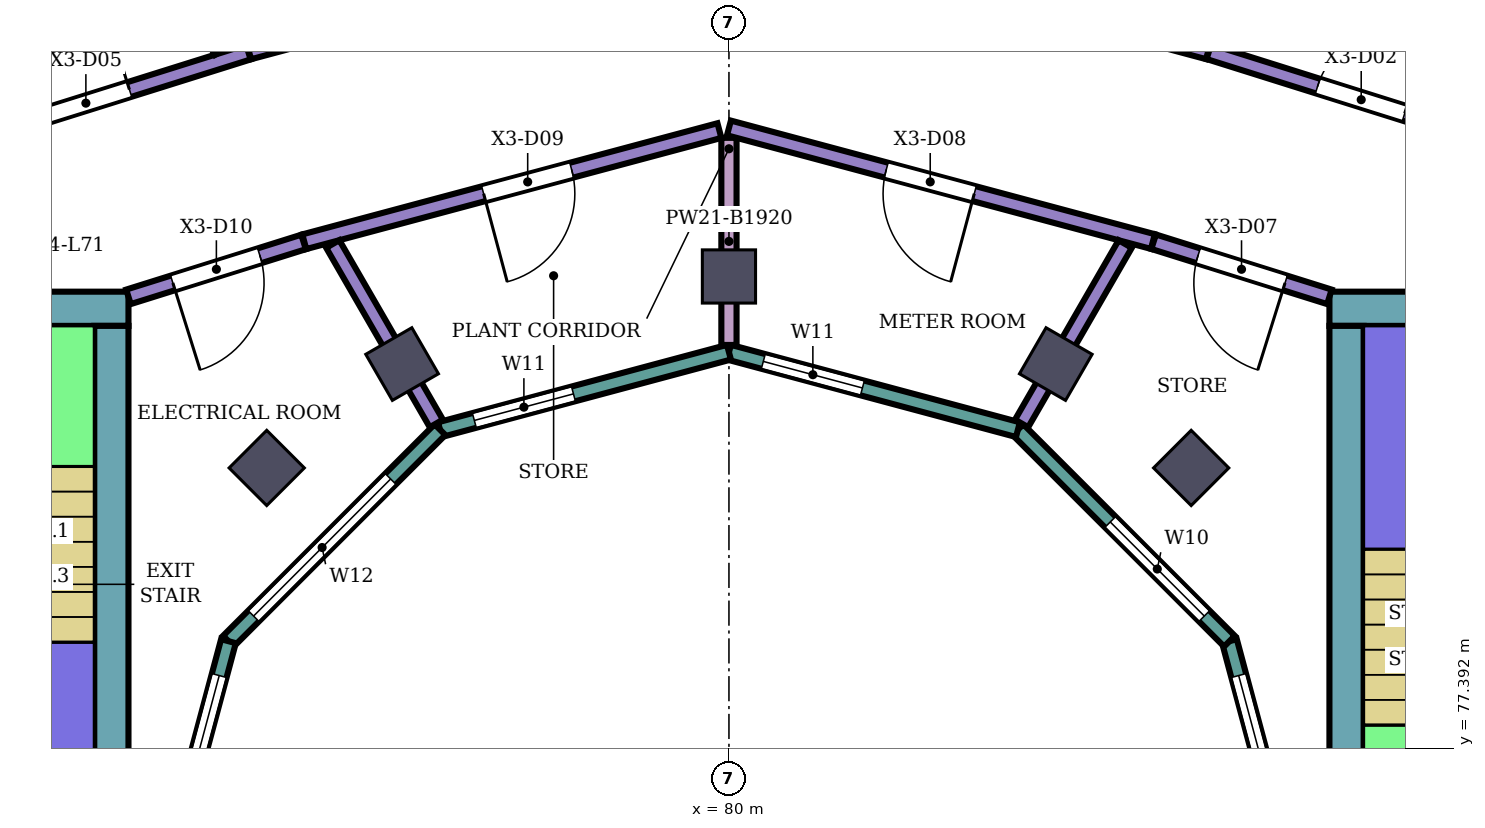
"""IFC4 building model, lengths in metres.
Left out: names, types, materials, properties, quantities, classifications, styles, units other than length and angle.
Written with IfcOpenShell. Run it as: python <this file> out.ifc"""

import sys

from ifc_helpers import new_model, si_unit, direction, frame, frame_2d, origin, origin_2d, place, context, subcontext, project, spatial, rectangle, extrude, element, fill, save


model = new_model("IFC4")
c1 = context("Model", 3, precision=1e-05, world=origin(), true_north=direction((0.0, 1.0)))
c2 = subcontext(c1, "Body", "Model", "MODEL_VIEW")
j1 = project(units=[si_unit("LENGTHUNIT", "METRE"), si_unit("PLANEANGLEUNIT", "RADIAN")], contexts=[c1])
p1 = place(None, origin())
s1 = spatial("IfcSite", under=j1, at=p1, CompositionType="ELEMENT")
p2 = place(p1, origin())
s2 = spatial("IfcBuilding", under=s1, at=p2, CompositionType="ELEMENT")
p3 = place(p2, frame((0.0, 0.0, 309.3)))
s3 = spatial("IfcBuildingStorey", under=s2, at=p3, CompositionType="ELEMENT", Elevation=309.3)
for number, where, z_axis, x_axis in (
    (1, (86.081, 81.081, 0.0), (0.0, 0.0, 1.0), (0.707, 0.707, 0.0)),
    (2, (84.3, 82.448, 0.0), (0.0, 0.0, 1.0), (0.5, 0.866, 0.0)),
    (3, (80.0, 83.6, 0.0), (0.0, 0.0, 1.0), (0.0, 1.0, 0.0)),
    (4, (75.7, 82.448, 0.0), (0.0, 0.0, 1.0), (-0.5, 0.866, 0.0)),
    (5, (73.919, 81.081, 0.0), (0.0, 0.0, 1.0), (-0.707, 0.707, 0.0)),
):
    element("IfcColumn", number, at=place(p3, frame(where, z_axis=z_axis, x_axis=x_axis)), inside=s3, PredefinedType="COLUMN", context=c2, shape_type="SweptSolid", body=[
        extrude(rectangle(XDim=0.7, YDim=0.7, at=origin_2d()), origin(), (0.0, 0.0, 1.0), 5.6),
    ])
p4 = place(p3, frame((87.9, 83.175, 0.0), z_axis=(0.0, 0.0, 1.0), x_axis=(1.0, 0.0, 0.0)))
e6 = element("IfcWall", 6, at=p4, inside=s3, PredefinedType="SHEAR", context=c2, shape_type="SweptSolid", body=[
    extrude(rectangle(XDim=12.0, YDim=0.45, at=frame_2d((6.0, 0.0))), origin(), (0.0, 0.0, 1.0), 5.28),
])
p5 = place(p4, frame((4.2, 0.0, 0.0)))
e7 = element("IfcOpeningElement", 7, at=p5, cuts=e6, PredefinedType="OPENING", context=c2, shape_type="SweptSolid", body=[
    extrude(rectangle(XDim=2.4, YDim=2.4, at=frame_2d((1.2, 1.2))), frame((0.0, 0.235, 0.0), z_axis=(0.0, -1.0, 0.0), x_axis=(1.0, 0.0, 0.0)), (0.0, 0.0, 1.0), 0.47),
])
p6 = place(p3, frame((88.125, 75.0, 0.0), z_axis=(0.0, 0.0, 1.0), x_axis=(0.0, 1.0, 0.0)))
e8 = element("IfcWall", 8, at=p6, inside=s3, PredefinedType="SHEAR", context=c2, shape_type="SweptSolid", body=[
    extrude(rectangle(XDim=7.95, YDim=0.45, at=frame_2d((3.975, 0.0))), origin(), (0.0, 0.0, 1.0), 5.28),
])
p7 = place(p3, frame((72.1, 83.175, 0.0), z_axis=(0.0, 0.0, 1.0), x_axis=(-1.0, 0.0, 0.0)))
e9 = element("IfcWall", 9, at=p7, inside=s3, PredefinedType="SHEAR", context=c2, shape_type="SweptSolid", body=[
    extrude(rectangle(XDim=12.0, YDim=0.45, at=frame_2d((6.0, 0.0))), origin(), (0.0, 0.0, 1.0), 5.28),
])
p8 = place(p7, frame((4.2, 0.0, 0.0)))
e10 = element("IfcOpeningElement", 10, at=p8, cuts=e9, PredefinedType="OPENING", context=c2, shape_type="SweptSolid", body=[
    extrude(rectangle(XDim=2.4, YDim=2.4, at=frame_2d((1.2, 1.2))), frame((0.0, 0.235, 0.0), z_axis=(0.0, -1.0, 0.0), x_axis=(1.0, 0.0, 0.0)), (0.0, 0.0, 1.0), 0.47),
])
p9 = place(p3, frame((71.875, 82.95, 0.0), z_axis=(0.0, 0.0, 1.0), x_axis=(0.0, -1.0, 0.0)))
e11 = element("IfcWall", 11, at=p9, inside=s3, PredefinedType="SHEAR", context=c2, shape_type="SweptSolid", body=[
    extrude(rectangle(XDim=7.95, YDim=0.45, at=frame_2d((3.975, 0.0))), origin(), (0.0, 0.0, 1.0), 5.28),
])
p10 = place(p3, frame((87.604, 75.0, 0.0), z_axis=(0.0, 0.0, 1.0), x_axis=(-0.258789828301, 0.965933654434, 0.0)))
e12 = element("IfcWall", 12, at=p10, inside=s3, PredefinedType="NOTDEFINED", context=c2, shape_type="SweptSolid", body=[
    extrude(rectangle(XDim=3.936, YDim=0.2, at=frame_2d((1.968, 0.0))), origin(), (0.0, 0.0, 1.0), 5.6),
])
p11 = place(p10, frame((0.468, 0.0, 0.9)))
e13 = element("IfcOpeningElement", 13, at=p11, cuts=e12, PredefinedType="OPENING", context=c2, shape_type="SweptSolid", body=[
    extrude(rectangle(XDim=3.0, YDim=2.3, at=frame_2d((1.5, 1.15))), frame((0.0, 0.11, 0.0), z_axis=(0.0, -1.0, 0.0), x_axis=(1.0, 0.0, 0.0)), (0.0, 0.0, 1.0), 0.22),
])
p12 = place(p3, frame((86.585, 78.802, 0.0), z_axis=(0.0, 0.0, 1.0), x_axis=(-0.707106781187, 0.707106781187, 0.0)))
e14 = element("IfcWall", 14, at=p12, inside=s3, PredefinedType="NOTDEFINED", context=c2, shape_type="SweptSolid", body=[
    extrude(rectangle(XDim=3.936, YDim=0.2, at=frame_2d((1.968, 0.0))), origin(), (0.0, 0.0, 1.0), 5.6),
])
p13 = place(p12, frame((0.468, 0.0, 0.9)))
e15 = element("IfcOpeningElement", 15, at=p13, cuts=e14, PredefinedType="OPENING", context=c2, shape_type="SweptSolid", body=[
    extrude(rectangle(XDim=1.75, YDim=2.3, at=frame_2d((0.875, 1.15))), frame((0.0, 0.11, 0.0), z_axis=(0.0, -1.0, 0.0), x_axis=(1.0, 0.0, 0.0)), (0.0, 0.0, 1.0), 0.22),
])
p14 = place(p3, frame((83.802, 81.585, 0.0), z_axis=(0.0, 0.0, 1.0), x_axis=(-0.965933654434, 0.258789828301, 0.0)))
e16 = element("IfcWall", 16, at=p14, inside=s3, PredefinedType="NOTDEFINED", context=c2, shape_type="SweptSolid", body=[
    extrude(rectangle(XDim=3.936, YDim=0.2, at=frame_2d((1.968, 0.0))), origin(), (0.0, 0.0, 1.0), 5.6),
])
p15 = place(p14, frame((2.118, 0.0, 0.9)))
e17 = element("IfcOpeningElement", 17, at=p15, cuts=e16, PredefinedType="OPENING", context=c2, shape_type="SweptSolid", body=[
    extrude(rectangle(XDim=1.35, YDim=2.3, at=frame_2d((0.675, 1.15))), frame((0.0, 0.11, 0.0), z_axis=(0.0, -1.0, 0.0), x_axis=(1.0, 0.0, 0.0)), (0.0, 0.0, 1.0), 0.22),
])
p16 = place(p3, frame((80.0, 82.604, 0.0), z_axis=(0.0, 0.0, 1.0), x_axis=(-0.965933654434, -0.258789828301, 0.0)))
e18 = element("IfcWall", 18, at=p16, inside=s3, PredefinedType="NOTDEFINED", context=c2, shape_type="SweptSolid", body=[
    extrude(rectangle(XDim=3.936, YDim=0.2, at=frame_2d((1.968, 0.0))), origin(), (0.0, 0.0, 1.0), 5.6),
])
p17 = place(p16, frame((2.118, 0.0, 0.9)))
e19 = element("IfcOpeningElement", 19, at=p17, cuts=e18, PredefinedType="OPENING", context=c2, shape_type="SweptSolid", body=[
    extrude(rectangle(XDim=1.35, YDim=2.3, at=frame_2d((0.675, 1.15))), frame((0.0, 0.11, 0.0), z_axis=(0.0, -1.0, 0.0), x_axis=(1.0, 0.0, 0.0)), (0.0, 0.0, 1.0), 0.22),
])
p18 = place(p3, frame((76.198, 81.585, 0.0), z_axis=(0.0, 0.0, 1.0), x_axis=(-0.707106781187, -0.707106781187, 0.0)))
e20 = element("IfcWall", 20, at=p18, inside=s3, PredefinedType="NOTDEFINED", context=c2, shape_type="SweptSolid", body=[
    extrude(rectangle(XDim=3.936, YDim=0.2, at=frame_2d((1.968, 0.0))), origin(), (0.0, 0.0, 1.0), 5.6),
])
p19 = place(p18, frame((0.918, 0.0, 0.9)))
e21 = element("IfcOpeningElement", 21, at=p19, cuts=e20, PredefinedType="OPENING", context=c2, shape_type="SweptSolid", body=[
    extrude(rectangle(XDim=2.55, YDim=2.3, at=frame_2d((1.275, 1.15))), frame((0.0, 0.11, 0.0), z_axis=(0.0, -1.0, 0.0), x_axis=(1.0, 0.0, 0.0)), (0.0, 0.0, 1.0), 0.22),
])
p20 = place(p3, frame((73.415, 78.802, 0.0), z_axis=(0.0, 0.0, 1.0), x_axis=(-0.258789828301, -0.965933654434, 0.0)))
e22 = element("IfcWall", 22, at=p20, inside=s3, PredefinedType="NOTDEFINED", context=c2, shape_type="SweptSolid", body=[
    extrude(rectangle(XDim=3.936, YDim=0.2, at=frame_2d((1.968, 0.0))), origin(), (0.0, 0.0, 1.0), 5.6),
])
p21 = place(p20, frame((0.468, 0.0, 0.9)))
e23 = element("IfcOpeningElement", 23, at=p21, cuts=e22, PredefinedType="OPENING", context=c2, shape_type="SweptSolid", body=[
    extrude(rectangle(XDim=3.0, YDim=2.3, at=frame_2d((1.5, 1.15))), frame((0.0, 0.11, 0.0), z_axis=(0.0, -1.0, 0.0), x_axis=(1.0, 0.0, 0.0)), (0.0, 0.0, 1.0), 0.22),
])
p22 = place(p3, frame((68.201, 84.833, 0.0), z_axis=(0.0, 0.0, 1.0), x_axis=(0.95420102455, 0.299166182492, 0.0)))
e24 = element("IfcWall", 24, at=p22, inside=s3, PredefinedType="PARTITIONING", context=c2, shape_type="SweptSolid", body=[
    extrude(rectangle(XDim=5.74, YDim=0.2, at=frame_2d((2.87, 0.0))), origin(), (0.0, 0.0, 1.0), 5.15),
])
p23 = place(p22, frame((2.899, 0.0, 0.0)))
e25 = element("IfcOpeningElement", 25, at=p23, cuts=e24, PredefinedType="OPENING", context=c2, shape_type="SweptSolid", body=[
    extrude(rectangle(XDim=1.2, YDim=2.4, at=frame_2d((0.6, 1.2))), frame((0.0, 0.11, 0.0), z_axis=(0.0, -1.0, 0.0), x_axis=(1.0, 0.0, 0.0)), (0.0, 0.0, 1.0), 0.22),
])
p24 = place(p3, frame((68.852, 94.311, 0.0), z_axis=(0.0, 0.0, 1.0), x_axis=(0.499940606313, -0.86605969203, 0.0)))
e26 = element("IfcWall", 26, at=p24, inside=s3, PredefinedType="PARTITIONING", context=c2, shape_type="SweptSolid", body=[
    extrude(rectangle(XDim=8.945, YDim=0.2, at=frame_2d((4.472, 0.0))), origin(), (0.0, 0.0, 1.0), 4.812),
])
p25 = place(p3, frame((72.1, 83.332, 0.0), z_axis=(0.0, 0.0, 1.0), x_axis=(0.954233106619, 0.299063836383, 0.0)))
e27 = element("IfcWall", 27, at=p25, inside=s3, PredefinedType="PARTITIONING", context=c2, shape_type="SweptSolid", body=[
    extrude(rectangle(XDim=2.414, YDim=0.2, at=frame_2d((1.207, 0.0))), origin(), (0.0, 0.0, 1.0), 5.15),
])
p26 = place(p25, frame((0.612, 0.0, 0.0)))
e28 = element("IfcOpeningElement", 28, at=p26, cuts=e27, PredefinedType="OPENING", context=c2, shape_type="SweptSolid", body=[
    extrude(rectangle(XDim=1.2, YDim=2.4, at=frame_2d((0.6, 1.2))), frame((0.0, 0.11, 0.0), z_axis=(0.0, -1.0, 0.0), x_axis=(1.0, 0.0, 0.0)), (0.0, 0.0, 1.0), 0.22),
])
p27 = place(p3, frame((73.687, 86.554, 0.0), z_axis=(0.0, 0.0, 1.0), x_axis=(0.96595903825, 0.258695064551, 0.0)))
e29 = element("IfcWall", 29, at=p27, inside=s3, PredefinedType="PARTITIONING", context=c2, shape_type="SweptSolid", body=[
    extrude(rectangle(XDim=6.446, YDim=0.2, at=frame_2d((3.223, 0.0))), origin(), (0.0, 0.0, 1.0), 5.15),
])
p28 = place(p27, frame((2.668, 0.0, 0.0)))
e30 = element("IfcOpeningElement", 30, at=p28, cuts=e29, PredefinedType="OPENING", context=c2, shape_type="SweptSolid", body=[
    extrude(rectangle(XDim=1.2, YDim=2.4, at=frame_2d((0.6, 1.2))), frame((0.0, 0.11, 0.0), z_axis=(0.0, -1.0, 0.0), x_axis=(1.0, 0.0, 0.0)), (0.0, 0.0, 1.0), 0.22),
])
p29 = place(p3, frame((74.413, 84.057, 0.0), z_axis=(0.0, 0.0, 1.0), x_axis=(0.965972135939, 0.258646153246, 0.0)))
e31 = element("IfcWall", 31, at=p29, inside=s3, PredefinedType="PARTITIONING", context=c2, shape_type="SweptSolid", body=[
    extrude(rectangle(XDim=5.654, YDim=0.2, at=frame_2d((2.827, 0.0))), origin(), (0.0, 0.0, 1.0), 5.15),
])
p30 = place(p29, frame((2.443, 0.0, 0.0)))
e32 = element("IfcOpeningElement", 32, at=p30, cuts=e31, PredefinedType="OPENING", context=c2, shape_type="SweptSolid", body=[
    extrude(rectangle(XDim=1.2, YDim=2.4, at=frame_2d((0.6, 1.2))), frame((0.0, 0.11, 0.0), z_axis=(0.0, -1.0, 0.0), x_axis=(1.0, 0.0, 0.0)), (0.0, 0.0, 1.0), 0.22),
])
p31 = place(p3, frame((74.788, 84.027, 0.0), z_axis=(0.0, 0.0, 1.0), x_axis=(0.49997314572, -0.866040907555, 0.0)))
e33 = element("IfcWall", 33, at=p31, inside=s3, PredefinedType="PARTITIONING", context=c2, shape_type="SweptSolid", body=[
    extrude(rectangle(XDim=2.726, YDim=0.2, at=frame_2d((1.363, 0.0))), origin(), (0.0, 0.0, 1.0), 5.15),
])
p32 = place(p3, frame((80.0, 82.699, 0.0), z_axis=(0.0, 0.0, 1.0), x_axis=(0.0, 1.0, 0.0)))
e34 = element("IfcWall", 34, at=p32, inside=s3, PredefinedType="PARTITIONING", context=c2, shape_type="SweptSolid", body=[
    extrude(rectangle(XDim=2.725, YDim=0.2, at=frame_2d((1.363, 0.0))), origin(), (0.0, 0.0, 1.0), 3.68),
])
p33 = place(p3, frame((80.0, 85.554, 0.0), z_axis=(0.0, 0.0, 1.0), x_axis=(0.965928989968, -0.258807237802, 0.0)))
e35 = element("IfcWall", 35, at=p33, inside=s3, PredefinedType="PARTITIONING", context=c2, shape_type="SweptSolid", body=[
    extrude(rectangle(XDim=5.774, YDim=0.2, at=frame_2d((2.887, 0.0))), origin(), (0.0, 0.0, 1.0), 5.15),
])
p34 = place(p33, frame((2.141, 0.0, 0.0)))
e36 = element("IfcOpeningElement", 36, at=p34, cuts=e35, PredefinedType="OPENING", context=c2, shape_type="SweptSolid", body=[
    extrude(rectangle(XDim=1.2, YDim=2.4, at=frame_2d((0.6, 1.2))), frame((0.0, 0.11, 0.0), z_axis=(0.0, -1.0, 0.0), x_axis=(1.0, 0.0, 0.0)), (0.0, 0.0, 1.0), 0.22),
])
p35 = place(p3, frame((80.087, 88.223, 0.0), z_axis=(0.0, 0.0, 1.0), x_axis=(0.965861823169, -0.25905778997, 0.0)))
e37 = element("IfcWall", 37, at=p35, inside=s3, PredefinedType="PARTITIONING", context=c2, shape_type="SweptSolid", body=[
    extrude(rectangle(XDim=6.436, YDim=0.2, at=frame_2d((3.218, 0.0))), origin(), (0.0, 0.0, 1.0), 5.15),
])
p36 = place(p35, frame((1.084, 0.0, 0.0)))
e38 = element("IfcOpeningElement", 38, at=p36, cuts=e37, PredefinedType="OPENING", context=c2, shape_type="SweptSolid", body=[
    extrude(rectangle(XDim=1.1, YDim=2.1, at=frame_2d((0.55, 1.05))), frame((0.0, 0.11, 0.0), z_axis=(0.0, -1.0, 0.0), x_axis=(1.0, 0.0, 0.0)), (0.0, 0.0, 1.0), 0.22),
])
p37 = place(p3, frame((83.85, 81.667, 0.0), z_axis=(0.0, 0.0, 1.0), x_axis=(0.500185068774, 0.865918527909, 0.0)))
e39 = element("IfcWall", 39, at=p37, inside=s3, PredefinedType="PARTITIONING", context=c2, shape_type="SweptSolid", body=[
    extrude(rectangle(XDim=2.726, YDim=0.2, at=frame_2d((1.363, 0.0))), origin(), (0.0, 0.0, 1.0), 5.15),
])
p38 = place(p3, frame((85.587, 84.057, 0.0), z_axis=(0.0, 0.0, 1.0), x_axis=(0.954239513179, -0.299043393987, 0.0)))
e40 = element("IfcWall", 40, at=p38, inside=s3, PredefinedType="PARTITIONING", context=c2, shape_type="SweptSolid", body=[
    extrude(rectangle(XDim=2.424, YDim=0.2, at=frame_2d((1.212, 0.0))), origin(), (0.0, 0.0, 1.0), 5.15),
])
p39 = place(p38, frame((0.612, 0.0, 0.0)))
e41 = element("IfcOpeningElement", 41, at=p39, cuts=e40, PredefinedType="OPENING", context=c2, shape_type="SweptSolid", body=[
    extrude(rectangle(XDim=1.2, YDim=2.4, at=frame_2d((0.6, 1.2))), frame((0.0, 0.11, 0.0), z_axis=(0.0, -1.0, 0.0), x_axis=(1.0, 0.0, 0.0)), (0.0, 0.0, 1.0), 0.22),
])
p40 = place(p3, frame((86.313, 86.556, 0.0), z_axis=(0.0, 0.0, 1.0), x_axis=(0.95397278515, -0.299893189641, 0.0)))
e42 = element("IfcWall", 42, at=p40, inside=s3, PredefinedType="PARTITIONING", context=c2, shape_type="SweptSolid", body=[
    extrude(rectangle(XDim=5.72, YDim=0.2, at=frame_2d((2.86, 0.0))), origin(), (0.0, 0.0, 1.0), 5.15),
])
p41 = place(p40, frame((1.501, 0.0, 0.0)))
e43 = element("IfcOpeningElement", 43, at=p41, cuts=e42, PredefinedType="OPENING", context=c2, shape_type="SweptSolid", body=[
    extrude(rectangle(XDim=1.2, YDim=2.4, at=frame_2d((0.6, 1.2))), frame((0.0, 0.11, 0.0), z_axis=(0.0, -1.0, 0.0), x_axis=(1.0, 0.0, 0.0)), (0.0, 0.0, 1.0), 0.22),
])
p42 = place(p11, origin())
e44 = element("IfcWindow", 44, at=p42, inside=s3, PartitioningType="SINGLE_PANEL", PredefinedType="WINDOW", context=c2, shape_type="SweptSolid", body=[
    extrude(rectangle(XDim=3.0, YDim=2.3, at=frame_2d((1.5, 1.15))), frame((0.0, 0.03, 0.0), z_axis=(0.0, -1.0, 0.0), x_axis=(1.0, 0.0, 0.0)), (0.0, 0.0, 1.0), 0.06),
])
fill(e13, e44)
p43 = place(p13, origin())
e45 = element("IfcWindow", 45, at=p43, inside=s3, PartitioningType="SINGLE_PANEL", PredefinedType="WINDOW", context=c2, shape_type="SweptSolid", body=[
    extrude(rectangle(XDim=1.75, YDim=2.3, at=frame_2d((0.875, 1.15))), frame((0.0, 0.03, 0.0), z_axis=(0.0, -1.0, 0.0), x_axis=(1.0, 0.0, 0.0)), (0.0, 0.0, 1.0), 0.06),
])
fill(e15, e45)
p44 = place(p15, origin())
e46 = element("IfcWindow", 46, at=p44, inside=s3, PartitioningType="SINGLE_PANEL", PredefinedType="WINDOW", context=c2, shape_type="SweptSolid", body=[
    extrude(rectangle(XDim=1.35, YDim=2.3, at=frame_2d((0.675, 1.15))), frame((0.0, 0.03, 0.0), z_axis=(0.0, -1.0, 0.0), x_axis=(1.0, 0.0, 0.0)), (0.0, 0.0, 1.0), 0.06),
])
fill(e17, e46)
p45 = place(p17, origin())
e47 = element("IfcWindow", 47, at=p45, inside=s3, PartitioningType="SINGLE_PANEL", PredefinedType="WINDOW", context=c2, shape_type="SweptSolid", body=[
    extrude(rectangle(XDim=1.35, YDim=2.3, at=frame_2d((0.675, 1.15))), frame((0.0, 0.03, 0.0), z_axis=(0.0, -1.0, 0.0), x_axis=(1.0, 0.0, 0.0)), (0.0, 0.0, 1.0), 0.06),
])
fill(e19, e47)
p46 = place(p19, origin())
e48 = element("IfcWindow", 48, at=p46, inside=s3, PartitioningType="SINGLE_PANEL", PredefinedType="WINDOW", context=c2, shape_type="SweptSolid", body=[
    extrude(rectangle(XDim=2.55, YDim=2.3, at=frame_2d((1.275, 1.15))), frame((0.0, 0.03, 0.0), z_axis=(0.0, -1.0, 0.0), x_axis=(1.0, 0.0, 0.0)), (0.0, 0.0, 1.0), 0.06),
])
fill(e21, e48)
p47 = place(p21, origin())
e49 = element("IfcWindow", 49, at=p47, inside=s3, PartitioningType="SINGLE_PANEL", PredefinedType="WINDOW", context=c2, shape_type="SweptSolid", body=[
    extrude(rectangle(XDim=3.0, YDim=2.3, at=frame_2d((1.5, 1.15))), frame((0.0, 0.03, 0.0), z_axis=(0.0, -1.0, 0.0), x_axis=(1.0, 0.0, 0.0)), (0.0, 0.0, 1.0), 0.06),
])
fill(e23, e49)
p48 = place(p41, origin())
e50 = element("IfcDoor", 50, at=p48, inside=s3, OperationType="SINGLE_SWING_RIGHT", PredefinedType="DOOR", context=c2, shape_type="SweptSolid", body=[
    extrude(rectangle(XDim=1.2, YDim=2.4, at=frame_2d((0.6, 1.2))), frame((0.0, 0.025, 0.0), z_axis=(0.0, -1.0, 0.0), x_axis=(1.0, 0.0, 0.0)), (0.0, 0.0, 1.0), 0.05),
])
fill(e43, e50)
p49 = place(p23, origin())
e51 = element("IfcDoor", 51, at=p49, inside=s3, OperationType="SINGLE_SWING_RIGHT", PredefinedType="DOOR", context=c2, shape_type="SweptSolid", body=[
    extrude(rectangle(XDim=1.2, YDim=2.4, at=frame_2d((0.6, 1.2))), frame((0.0, 0.025, 0.0), z_axis=(0.0, -1.0, 0.0), x_axis=(1.0, 0.0, 0.0)), (0.0, 0.0, 1.0), 0.05),
])
fill(e25, e51)
p50 = place(p39, frame((1.2, 0.0, 0.0), z_axis=(0.0, 0.0, 1.0), x_axis=(-1.0, 0.0, 0.0)))
e52 = element("IfcDoor", 52, at=p50, inside=s3, OperationType="SINGLE_SWING_LEFT", PredefinedType="DOOR", context=c2, shape_type="SweptSolid", body=[
    extrude(rectangle(XDim=1.2, YDim=2.4, at=frame_2d((0.6, 1.2))), frame((0.0, 0.025, 0.0), z_axis=(0.0, -1.0, 0.0), x_axis=(1.0, 0.0, 0.0)), (0.0, 0.0, 1.0), 0.05),
])
fill(e41, e52)
p51 = place(p34, frame((1.2, 0.0, 0.0), z_axis=(0.0, 0.0, 1.0), x_axis=(-1.0, 0.0, 0.0)))
e53 = element("IfcDoor", 53, at=p51, inside=s3, OperationType="SINGLE_SWING_LEFT", PredefinedType="DOOR", context=c2, shape_type="SweptSolid", body=[
    extrude(rectangle(XDim=1.2, YDim=2.4, at=frame_2d((0.6, 1.2))), frame((0.0, 0.025, 0.0), z_axis=(0.0, -1.0, 0.0), x_axis=(1.0, 0.0, 0.0)), (0.0, 0.0, 1.0), 0.05),
])
fill(e36, e53)
p52 = place(p30, frame((1.2, 0.0, 0.0), z_axis=(0.0, 0.0, 1.0), x_axis=(-1.0, 0.0, 0.0)))
e54 = element("IfcDoor", 54, at=p52, inside=s3, OperationType="SINGLE_SWING_RIGHT", PredefinedType="DOOR", context=c2, shape_type="SweptSolid", body=[
    extrude(rectangle(XDim=1.2, YDim=2.4, at=frame_2d((0.6, 1.2))), frame((0.0, 0.025, 0.0), z_axis=(0.0, -1.0, 0.0), x_axis=(1.0, 0.0, 0.0)), (0.0, 0.0, 1.0), 0.05),
])
fill(e32, e54)
p53 = place(p26, frame((1.2, 0.0, 0.0), z_axis=(0.0, 0.0, 1.0), x_axis=(-1.0, 0.0, 0.0)))
e55 = element("IfcDoor", 55, at=p53, inside=s3, OperationType="SINGLE_SWING_RIGHT", PredefinedType="DOOR", context=c2, shape_type="SweptSolid", body=[
    extrude(rectangle(XDim=1.2, YDim=2.4, at=frame_2d((0.6, 1.2))), frame((0.0, 0.025, 0.0), z_axis=(0.0, -1.0, 0.0), x_axis=(1.0, 0.0, 0.0)), (0.0, 0.0, 1.0), 0.05),
])
fill(e28, e55)
save(model, sys.argv[1])
